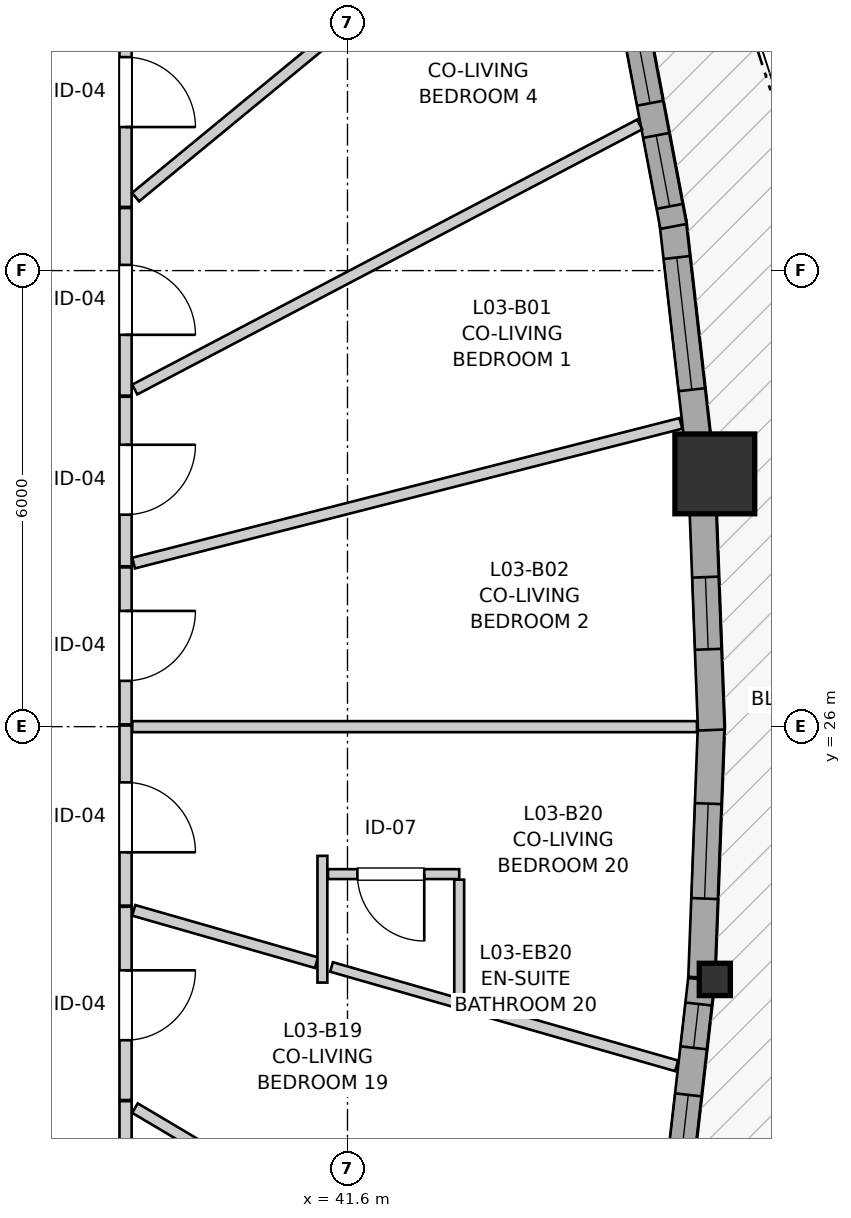
"""IFC4 building model, lengths in metres.
Left out: names, types, materials, properties, quantities, classifications, styles, units other than length and angle.
Written with IfcOpenShell. Run it as: python <this file> out.ifc"""

import sys

from ifc_helpers import new_model, si_unit, direction, frame, frame_2d, origin, origin_2d, place, context, subcontext, project, spatial, rectangle, i_section, extrude, source, transform, mapped, element, fill, save


model = new_model("IFC4")
c1 = context("Model", 3, precision=1e-05, world=origin(), true_north=direction((0.0, 1.0)))
c2 = subcontext(c1, "Body", "Model", "MODEL_VIEW")
j1 = project(units=[si_unit("LENGTHUNIT", "METRE"), si_unit("PLANEANGLEUNIT", "RADIAN")], contexts=[c1])
p1 = place(None, origin())
s1 = spatial("IfcSite", under=j1, at=p1, CompositionType="ELEMENT")
p2 = place(p1, origin())
s2 = spatial("IfcBuilding", under=s1, at=p2, CompositionType="ELEMENT")
p3 = place(p2, frame((0.0, 0.0, 14.2)))
s3 = spatial("IfcBuildingStorey", under=s2, at=p3, CompositionType="ELEMENT", Elevation=14.2)
m1 = source(origin(), c2, "Body", "SweptSolid", [
    extrude(i_section(OverallWidth=0.409, OverallDepth=0.425, WebThickness=0.03, FlangeThickness=0.048, FilletRadius=0.015, at=origin_2d()), origin(), (0.0, 0.0, 1.0), 2.94),
])
p4 = place(p3, frame((46.433, 22.675, 0.0), z_axis=(0.0, 0.0, 1.0), x_axis=(1.0, 0.0, 0.0)))
e1 = element("IfcColumn", 1, at=p4, inside=s3, PredefinedType="PILASTER", context=c2, shape_type="MappedRepresentation", body=[
    mapped(m1, transform((0.0, 0.0, 0.0), x_axis=(1.0, 0.0, 0.0), y_axis=(0.0, 1.0, 0.0), z_axis=(0.0, 0.0, 1.0), scale=1.0)),
])
m2 = source(origin(), c2, "Body", "SweptSolid", [
    extrude(rectangle(XDim=1.05, YDim=1.05, at=origin_2d()), origin(), (0.0, 0.0, 1.0), 2.94),
])
p5 = place(p3, frame((46.433, 29.325, 0.0), z_axis=(0.0, 0.0, 1.0), x_axis=(1.0, 0.0, 0.0)))
e2 = element("IfcColumn", 2, at=p5, inside=s3, PredefinedType="COLUMN", context=c2, shape_type="MappedRepresentation", body=[
    mapped(m2, transform((0.0, 0.0, 0.0), x_axis=(1.0, 0.0, 0.0), y_axis=(0.0, 1.0, 0.0), z_axis=(0.0, 0.0, 1.0), scale=1.0)),
])
p6 = place(p3, frame((45.875, 19.331, 0.0), z_axis=(0.0, 0.0, 1.0), x_axis=(0.113329685842, 0.99355743785, 0.0)))
e3 = element("IfcWall", 3, at=p6, inside=s3, PredefinedType="SOLIDWALL", context=c2, shape_type="SweptSolid", body=[
    extrude(rectangle(XDim=3.365, YDim=0.35, at=frame_2d((1.683, 0.0))), origin(), (0.0, 0.0, 1.0), 2.42),
])
p7 = place(p6, frame((0.437, 0.0, 0.82)))
e4 = element("IfcOpeningElement", 4, at=p7, cuts=e3, PredefinedType="OPENING", context=c2, shape_type="SweptSolid", body=[
    extrude(rectangle(XDim=1.4, YDim=1.35, at=frame_2d((0.7, 0.675))), frame((0.0, 0.185, 0.0), z_axis=(0.0, -1.0, 0.0), x_axis=(1.0, 0.0, 0.0)), (0.0, 0.0, 1.0), 0.37),
])
p8 = place(p6, frame((2.459, 0.0, 0.82)))
e5 = element("IfcOpeningElement", 5, at=p8, cuts=e3, PredefinedType="OPENING", context=c2, shape_type="SweptSolid", body=[
    extrude(rectangle(XDim=0.58, YDim=1.35, at=frame_2d((0.29, 0.675))), frame((0.0, 0.185, 0.0), z_axis=(0.0, -1.0, 0.0), x_axis=(1.0, 0.0, 0.0)), (0.0, 0.0, 1.0), 0.37),
])
p9 = place(p3, frame((46.259, 22.701, 0.0), z_axis=(0.0, 0.0, 1.0), x_axis=(0.038015581842, 0.99927714651, 0.0)))
e6 = element("IfcWall", 6, at=p9, inside=s3, PredefinedType="SOLIDWALL", context=c2, shape_type="SweptSolid", body=[
    extrude(rectangle(XDim=3.346, YDim=0.35, at=frame_2d((1.673, 0.0))), origin(), (0.0, 0.0, 1.0), 2.42),
])
p10 = place(p9, frame((1.038, 0.0, 0.82)))
e7 = element("IfcOpeningElement", 7, at=p10, cuts=e6, PredefinedType="OPENING", context=c2, shape_type="SweptSolid", body=[
    extrude(rectangle(XDim=1.25, YDim=1.35, at=frame_2d((0.625, 0.675))), frame((0.0, 0.185, 0.0), z_axis=(0.0, -1.0, 0.0), x_axis=(1.0, 0.0, 0.0)), (0.0, 0.0, 1.0), 0.37),
])
p11 = place(p3, frame((46.386, 25.955, 0.0), z_axis=(0.0, 0.0, 1.0), x_axis=(-0.038063081658, 0.99927533834, 0.0)))
e8 = element("IfcWall", 8, at=p11, inside=s3, PredefinedType="SOLIDWALL", context=c2, shape_type="SweptSolid", body=[
    extrude(rectangle(XDim=3.066, YDim=0.35, at=frame_2d((1.533, 0.0))), origin(), (0.0, 0.0, 1.0), 2.42),
])
p12 = place(p11, frame((1.063, 0.0, 0.82)))
e9 = element("IfcOpeningElement", 9, at=p12, cuts=e8, PredefinedType="OPENING", context=c2, shape_type="SweptSolid", body=[
    extrude(rectangle(XDim=0.95, YDim=1.35, at=frame_2d((0.475, 0.675))), frame((0.0, 0.185, 0.0), z_axis=(0.0, -1.0, 0.0), x_axis=(1.0, 0.0, 0.0)), (0.0, 0.0, 1.0), 0.37),
])
p13 = place(p3, frame((46.225, 29.604, 0.0), z_axis=(0.0, 0.0, 1.0), x_axis=(-0.113323399269, 0.993558154905, 0.0)))
e10 = element("IfcWall", 10, at=p13, inside=s3, PredefinedType="SOLIDWALL", context=c2, shape_type="SweptSolid", body=[
    extrude(rectangle(XDim=3.085, YDim=0.35, at=frame_2d((1.542, 0.0))), origin(), (0.0, 0.0, 1.0), 2.42),
])
p14 = place(p13, frame((0.835, 0.0, 0.82)))
e11 = element("IfcOpeningElement", 11, at=p14, cuts=e10, PredefinedType="OPENING", context=c2, shape_type="SweptSolid", body=[
    extrude(rectangle(XDim=1.75, YDim=1.3, at=frame_2d((0.875, 0.65))), frame((0.0, 0.185, 0.0), z_axis=(0.0, -1.0, 0.0), x_axis=(1.0, 0.0, 0.0)), (0.0, 0.0, 1.0), 0.37),
])
p15 = place(p3, frame((45.889, 32.581, 0.0), z_axis=(0.0, 0.0, 1.0), x_axis=(-0.186670339622, 0.98242260983, 0.0)))
e12 = element("IfcWall", 12, at=p15, inside=s3, PredefinedType="SOLIDWALL", context=c2, shape_type="SweptSolid", body=[
    extrude(rectangle(XDim=3.403, YDim=0.35, at=frame_2d((1.702, 0.0))), origin(), (0.0, 0.0, 1.0), 2.42),
])
p16 = place(p15, frame((0.269, 0.0, 0.82)))
e13 = element("IfcOpeningElement", 13, at=p16, cuts=e12, PredefinedType="OPENING", context=c2, shape_type="SweptSolid", body=[
    extrude(rectangle(XDim=0.95, YDim=1.35, at=frame_2d((0.475, 0.675))), frame((0.0, 0.185, 0.0), z_axis=(0.0, -1.0, 0.0), x_axis=(1.0, 0.0, 0.0)), (0.0, 0.0, 1.0), 0.37),
])
p17 = place(p15, frame((1.65, 0.0, 0.82)))
e14 = element("IfcOpeningElement", 14, at=p17, cuts=e12, PredefinedType="OPENING", context=c2, shape_type="SweptSolid", body=[
    extrude(rectangle(XDim=1.45, YDim=1.25, at=frame_2d((0.725, 0.625))), frame((0.0, 0.185, 0.0), z_axis=(0.0, -1.0, 0.0), x_axis=(1.0, 0.0, 0.0)), (0.0, 0.0, 1.0), 0.37),
])
p18 = place(p3, frame((38.68, 21.073, 0.0), z_axis=(0.0, 0.0, 1.0), x_axis=(0.0, -1.0, 0.0)))
e15 = element("IfcWall", 15, at=p18, inside=s3, PredefinedType="PARTITIONING", context=c2, shape_type="SweptSolid", body=[
    extrude(rectangle(XDim=3.589, YDim=0.16, at=frame_2d((1.794, 0.0))), origin(), (0.0, 0.0, 1.0), 2.94),
])
p19 = place(p18, frame((1.333, 0.0, 0.0)))
e16 = element("IfcOpeningElement", 16, at=p19, cuts=e15, PredefinedType="OPENING", context=c2, shape_type="SweptSolid", body=[
    extrude(rectangle(XDim=0.92, YDim=2.1, at=frame_2d((0.46, 1.05))), frame((0.0, 0.09, 0.0), z_axis=(0.0, -1.0, 0.0), x_axis=(1.0, 0.0, 0.0)), (0.0, 0.0, 1.0), 0.18),
])
p20 = place(p3, frame((38.68, 35.862, 0.0), z_axis=(0.0, 0.0, 1.0), x_axis=(0.0, -1.0, 0.0)))
e17 = element("IfcWall", 17, at=p20, inside=s3, PredefinedType="PARTITIONING", context=c2, shape_type="SweptSolid", body=[
    extrude(rectangle(XDim=3.024, YDim=0.16, at=frame_2d((1.512, 0.0))), origin(), (0.0, 0.0, 1.0), 2.94),
])
p21 = place(p20, frame((1.053, 0.0, 0.0)))
e18 = element("IfcOpeningElement", 18, at=p21, cuts=e17, PredefinedType="OPENING", context=c2, shape_type="SweptSolid", body=[
    extrude(rectangle(XDim=0.92, YDim=2.1, at=frame_2d((0.46, 1.05))), frame((0.0, 0.09, 0.0), z_axis=(0.0, -1.0, 0.0), x_axis=(1.0, 0.0, 0.0)), (0.0, 0.0, 1.0), 0.18),
])
p22 = place(p3, frame((38.68, 23.63, 0.0), z_axis=(0.0, 0.0, 1.0), x_axis=(0.0, -1.0, 0.0)))
e19 = element("IfcWall", 19, at=p22, inside=s3, PredefinedType="PARTITIONING", context=c2, shape_type="SweptSolid", body=[
    extrude(rectangle(XDim=2.542, YDim=0.16, at=frame_2d((1.271, 0.0))), origin(), (0.0, 0.0, 1.0), 2.94),
])
p23 = place(p22, frame((0.835, 0.0, 0.0)))
e20 = element("IfcOpeningElement", 20, at=p23, cuts=e19, PredefinedType="OPENING", context=c2, shape_type="SweptSolid", body=[
    extrude(rectangle(XDim=0.92, YDim=2.1, at=frame_2d((0.46, 1.05))), frame((0.0, 0.09, 0.0), z_axis=(0.0, -1.0, 0.0), x_axis=(1.0, 0.0, 0.0)), (0.0, 0.0, 1.0), 0.18),
])
p24 = place(p3, frame((38.68, 32.823, 0.0), z_axis=(0.0, 0.0, 1.0), x_axis=(0.0, -1.0, 0.0)))
e21 = element("IfcWall", 21, at=p24, inside=s3, PredefinedType="PARTITIONING", context=c2, shape_type="SweptSolid", body=[
    extrude(rectangle(XDim=2.468, YDim=0.16, at=frame_2d((1.234, 0.0))), origin(), (0.0, 0.0, 1.0), 2.94),
])
p25 = place(p24, frame((0.748, 0.0, 0.0)))
e22 = element("IfcOpeningElement", 22, at=p25, cuts=e21, PredefinedType="OPENING", context=c2, shape_type="SweptSolid", body=[
    extrude(rectangle(XDim=0.92, YDim=2.1, at=frame_2d((0.46, 1.05))), frame((0.0, 0.09, 0.0), z_axis=(0.0, -1.0, 0.0), x_axis=(1.0, 0.0, 0.0)), (0.0, 0.0, 1.0), 0.18),
])
p26 = place(p3, frame((38.68, 26.015, 0.0), z_axis=(0.0, 0.0, 1.0), x_axis=(0.0, -1.0, 0.0)))
e23 = element("IfcWall", 23, at=p26, inside=s3, PredefinedType="PARTITIONING", context=c2, shape_type="SweptSolid", body=[
    extrude(rectangle(XDim=2.37, YDim=0.16, at=frame_2d((1.185, 0.0))), origin(), (0.0, 0.0, 1.0), 2.94),
])
p27 = place(p26, frame((0.748, 0.0, 0.0)))
e24 = element("IfcOpeningElement", 24, at=p27, cuts=e23, PredefinedType="OPENING", context=c2, shape_type="SweptSolid", body=[
    extrude(rectangle(XDim=0.92, YDim=2.1, at=frame_2d((0.46, 1.05))), frame((0.0, 0.09, 0.0), z_axis=(0.0, -1.0, 0.0), x_axis=(1.0, 0.0, 0.0)), (0.0, 0.0, 1.0), 0.18),
])
p28 = place(p3, frame((38.68, 30.34, 0.0), z_axis=(0.0, 0.0, 1.0), x_axis=(0.0, -1.0, 0.0)))
e25 = element("IfcWall", 25, at=p28, inside=s3, PredefinedType="PARTITIONING", context=c2, shape_type="SweptSolid", body=[
    extrude(rectangle(XDim=2.23, YDim=0.16, at=frame_2d((1.115, 0.0))), origin(), (0.0, 0.0, 1.0), 2.94),
])
p29 = place(p28, frame((0.632, 0.0, 0.0)))
e26 = element("IfcOpeningElement", 26, at=p29, cuts=e25, PredefinedType="OPENING", context=c2, shape_type="SweptSolid", body=[
    extrude(rectangle(XDim=0.92, YDim=2.1, at=frame_2d((0.46, 1.05))), frame((0.0, 0.09, 0.0), z_axis=(0.0, -1.0, 0.0), x_axis=(1.0, 0.0, 0.0)), (0.0, 0.0, 1.0), 0.18),
])
p30 = place(p3, frame((38.68, 28.095, 0.0), z_axis=(0.0, 0.0, 1.0), x_axis=(0.0, -1.0, 0.0)))
e27 = element("IfcWall", 27, at=p30, inside=s3, PredefinedType="PARTITIONING", context=c2, shape_type="SweptSolid", body=[
    extrude(rectangle(XDim=2.065, YDim=0.16, at=frame_2d((1.032, 0.0))), origin(), (0.0, 0.0, 1.0), 2.94),
])
p31 = place(p30, frame((0.573, 0.0, 0.0)))
e28 = element("IfcOpeningElement", 28, at=p31, cuts=e27, PredefinedType="OPENING", context=c2, shape_type="SweptSolid", body=[
    extrude(rectangle(XDim=0.92, YDim=2.1, at=frame_2d((0.46, 1.05))), frame((0.0, 0.09, 0.0), z_axis=(0.0, -1.0, 0.0), x_axis=(1.0, 0.0, 0.0)), (0.0, 0.0, 1.0), 0.18),
])
p32 = place(p3, frame((43.07, 24.06, 0.0), z_axis=(0.0, 0.0, 1.0), x_axis=(-1.0, 0.0, 0.0)))
e29 = element("IfcWall", 29, at=p32, inside=s3, PredefinedType="PARTITIONING", context=c2, shape_type="SweptSolid", body=[
    extrude(rectangle(XDim=1.727, YDim=0.13, at=frame_2d((0.864, 0.0))), origin(), (0.0, 0.0, 1.0), 2.94),
])
p33 = place(p32, frame((0.46, 0.0, 0.0)))
e30 = element("IfcOpeningElement", 30, at=p33, cuts=e29, PredefinedType="OPENING", context=c2, shape_type="SweptSolid", body=[
    extrude(rectangle(XDim=0.88, YDim=2.05, at=frame_2d((0.44, 1.025))), frame((0.0, 0.075, 0.0), z_axis=(0.0, -1.0, 0.0), x_axis=(1.0, 0.0, 0.0)), (0.0, 0.0, 1.0), 0.15),
])
p34 = place(p3, frame((38.812, 32.967, 0.0), z_axis=(0.0, 0.0, 1.0), x_axis=(0.772048037558, 0.635564180633, 0.0)))
e31 = element("IfcWall", 31, at=p34, inside=s3, PredefinedType="PARTITIONING", context=c2, shape_type="SweptSolid", body=[
    extrude(rectangle(XDim=7.477, YDim=0.145, at=frame_2d((3.739, 0.0))), origin(), (0.0, 0.0, 1.0), 2.94),
])
p35 = place(p3, frame((38.801, 30.435, 0.0), z_axis=(0.0, 0.0, 1.0), x_axis=(0.885428701358, 0.46477523042, 0.0)))
e32 = element("IfcWall", 32, at=p35, inside=s3, PredefinedType="PARTITIONING", context=c2, shape_type="SweptSolid", body=[
    extrude(rectangle(XDim=7.503, YDim=0.145, at=frame_2d((3.751, 0.0))), origin(), (0.0, 0.0, 1.0), 2.94),
])
p36 = place(p3, frame((38.786, 28.152, 0.0), z_axis=(0.0, 0.0, 1.0), x_axis=(0.968940490632, 0.247294006424, 0.0)))
e33 = element("IfcWall", 33, at=p36, inside=s3, PredefinedType="PARTITIONING", context=c2, shape_type="SweptSolid", body=[
    extrude(rectangle(XDim=7.432, YDim=0.145, at=frame_2d((3.716, 0.0))), origin(), (0.0, 0.0, 1.0), 2.94),
])
p37 = place(p3, frame((38.768, 26.0, 0.0), z_axis=(0.0, 0.0, 1.0), x_axis=(1.0, 0.0, 0.0)))
e34 = element("IfcWall", 34, at=p37, inside=s3, PredefinedType="PARTITIONING", context=c2, shape_type="SweptSolid", body=[
    extrude(rectangle(XDim=7.43, YDim=0.145, at=frame_2d((3.715, 0.0))), origin(), (0.0, 0.0, 1.0), 2.94),
])
p38 = place(p3, frame((38.804, 20.981, 0.0), z_axis=(0.0, 0.0, 1.0), x_axis=(0.859905944731, -0.510452511225, 0.0)))
e35 = element("IfcWall", 35, at=p38, inside=s3, PredefinedType="PARTITIONING", context=c2, shape_type="SweptSolid", body=[
    extrude(rectangle(XDim=2.943, YDim=0.145, at=frame_2d((1.472, 0.0))), origin(), (0.0, 0.0, 1.0), 2.94),
])
p39 = place(p3, frame((43.055, 22.361, 0.0), z_axis=(0.0, 0.0, 1.0), x_axis=(0.961351316588, -0.275324619486, 0.0)))
e36 = element("IfcWall", 36, at=p39, inside=s3, PredefinedType="PARTITIONING", context=c2, shape_type="SweptSolid", body=[
    extrude(rectangle(XDim=2.992, YDim=0.145, at=frame_2d((1.496, 0.0))), origin(), (0.0, 0.0, 1.0), 2.94),
])
p40 = place(p3, frame((38.788, 23.583, 0.0), z_axis=(0.0, 0.0, 1.0), x_axis=(0.961350656565, -0.275326924078, 0.0)))
e37 = element("IfcWall", 37, at=p40, inside=s3, PredefinedType="PARTITIONING", context=c2, shape_type="SweptSolid", body=[
    extrude(rectangle(XDim=2.501, YDim=0.145, at=frame_2d((1.251, 0.0))), origin(), (0.0, 0.0, 1.0), 2.94),
])
p41 = place(p3, frame((41.39, 22.838, 0.0), z_axis=(0.0, 0.0, 1.0), x_axis=(0.961362810051, -0.275284484582, 0.0)))
e38 = element("IfcWall", 38, at=p41, inside=s3, PredefinedType="PARTITIONING", context=c2, shape_type="SweptSolid", body=[
    extrude(rectangle(XDim=1.717, YDim=0.13, at=frame_2d((0.858, 0.0))), origin(), (0.0, 0.0, 1.0), 2.94),
])
p42 = place(p3, frame((43.07, 22.459, 0.0), z_axis=(0.0, 0.0, 1.0), x_axis=(0.0, 1.0, 0.0)))
e39 = element("IfcWall", 39, at=p42, inside=s3, PredefinedType="PARTITIONING", context=c2, shape_type="SweptSolid", body=[
    extrude(rectangle(XDim=1.528, YDim=0.13, at=frame_2d((0.764, 0.0))), origin(), (0.0, 0.0, 1.0), 2.508),
])
p43 = place(p3, frame((41.27, 22.633, 0.0), z_axis=(0.0, 0.0, 1.0), x_axis=(0.0, 1.0, 0.0)))
e40 = element("IfcWall", 40, at=p43, inside=s3, PredefinedType="PARTITIONING", context=c2, shape_type="SweptSolid", body=[
    extrude(rectangle(XDim=1.667, YDim=0.13, at=frame_2d((0.833, 0.0))), origin(), (0.0, 0.0, 1.0), 2.94),
])
m3 = source(origin(), c2, "Body", "SweptSolid", [
    extrude(rectangle(XDim=1.4, YDim=1.35, at=frame_2d((0.7, 0.675))), frame((0.0, 0.03, 0.0), z_axis=(0.0, -1.0, 0.0), x_axis=(1.0, 0.0, 0.0)), (0.0, 0.0, 1.0), 0.06),
])
p44 = place(p7, origin())
e41 = element("IfcWindow", 41, at=p44, inside=s3, PartitioningType="SINGLE_PANEL", PredefinedType="WINDOW", context=c2, shape_type="MappedRepresentation", body=[
    mapped(m3, transform((0.0, 0.0, 0.0), x_axis=(1.0, 0.0, 0.0), y_axis=(0.0, 1.0, 0.0), z_axis=(0.0, 0.0, 1.0), scale=1.0)),
])
fill(e4, e41)
m4 = source(origin(), c2, "Body", "SweptSolid", [
    extrude(rectangle(XDim=0.58, YDim=1.35, at=frame_2d((0.29, 0.675))), frame((0.0, 0.03, 0.0), z_axis=(0.0, -1.0, 0.0), x_axis=(1.0, 0.0, 0.0)), (0.0, 0.0, 1.0), 0.06),
])
p45 = place(p8, origin())
e42 = element("IfcWindow", 42, at=p45, inside=s3, PartitioningType="SINGLE_PANEL", PredefinedType="WINDOW", context=c2, shape_type="MappedRepresentation", body=[
    mapped(m4, transform((0.0, 0.0, 0.0), x_axis=(1.0, 0.0, 0.0), y_axis=(0.0, 1.0, 0.0), z_axis=(0.0, 0.0, 1.0), scale=1.0)),
])
fill(e5, e42)
m5 = source(origin(), c2, "Body", "SweptSolid", [
    extrude(rectangle(XDim=1.25, YDim=1.35, at=frame_2d((0.625, 0.675))), frame((0.0, 0.03, 0.0), z_axis=(0.0, -1.0, 0.0), x_axis=(1.0, 0.0, 0.0)), (0.0, 0.0, 1.0), 0.06),
])
p46 = place(p10, origin())
e43 = element("IfcWindow", 43, at=p46, inside=s3, PartitioningType="SINGLE_PANEL", PredefinedType="WINDOW", context=c2, shape_type="MappedRepresentation", body=[
    mapped(m5, transform((0.0, 0.0, 0.0), x_axis=(1.0, 0.0, 0.0), y_axis=(0.0, 1.0, 0.0), z_axis=(0.0, 0.0, 1.0), scale=1.0)),
])
fill(e7, e43)
m6 = source(origin(), c2, "Body", "SweptSolid", [
    extrude(rectangle(XDim=0.95, YDim=1.35, at=frame_2d((0.475, 0.675))), frame((0.0, 0.03, 0.0), z_axis=(0.0, -1.0, 0.0), x_axis=(1.0, 0.0, 0.0)), (0.0, 0.0, 1.0), 0.06),
])
p47 = place(p12, origin())
e44 = element("IfcWindow", 44, at=p47, inside=s3, PartitioningType="SINGLE_PANEL", PredefinedType="WINDOW", context=c2, shape_type="MappedRepresentation", body=[
    mapped(m6, transform((0.0, 0.0, 0.0), x_axis=(1.0, 0.0, 0.0), y_axis=(0.0, 1.0, 0.0), z_axis=(0.0, 0.0, 1.0), scale=1.0)),
])
fill(e9, e44)
m7 = source(origin(), c2, "Body", "SweptSolid", [
    extrude(rectangle(XDim=1.75, YDim=1.3, at=frame_2d((0.875, 0.65))), frame((0.0, 0.03, 0.0), z_axis=(0.0, -1.0, 0.0), x_axis=(1.0, 0.0, 0.0)), (0.0, 0.0, 1.0), 0.06),
])
p48 = place(p14, origin())
e45 = element("IfcWindow", 45, at=p48, inside=s3, PartitioningType="SINGLE_PANEL", PredefinedType="WINDOW", context=c2, shape_type="MappedRepresentation", body=[
    mapped(m7, transform((0.0, 0.0, 0.0), x_axis=(1.0, 0.0, 0.0), y_axis=(0.0, 1.0, 0.0), z_axis=(0.0, 0.0, 1.0), scale=1.0)),
])
fill(e11, e45)
p49 = place(p16, origin())
e46 = element("IfcWindow", 46, at=p49, inside=s3, PartitioningType="SINGLE_PANEL", PredefinedType="WINDOW", context=c2, shape_type="MappedRepresentation", body=[
    mapped(m6, transform((0.0, 0.0, 0.0), x_axis=(1.0, 0.0, 0.0), y_axis=(0.0, 1.0, 0.0), z_axis=(0.0, 0.0, 1.0), scale=1.0)),
])
fill(e13, e46)
m8 = source(origin(), c2, "Body", "SweptSolid", [
    extrude(rectangle(XDim=1.45, YDim=1.25, at=frame_2d((0.725, 0.625))), frame((0.0, 0.03, 0.0), z_axis=(0.0, -1.0, 0.0), x_axis=(1.0, 0.0, 0.0)), (0.0, 0.0, 1.0), 0.06),
])
p50 = place(p17, origin())
e47 = element("IfcWindow", 47, at=p50, inside=s3, PartitioningType="SINGLE_PANEL", PredefinedType="WINDOW", context=c2, shape_type="MappedRepresentation", body=[
    mapped(m8, transform((0.0, 0.0, 0.0), x_axis=(1.0, 0.0, 0.0), y_axis=(0.0, 1.0, 0.0), z_axis=(0.0, 0.0, 1.0), scale=1.0)),
])
fill(e14, e47)
m9 = source(origin(), c2, "Body", "SweptSolid", [
    extrude(rectangle(XDim=0.92, YDim=2.1, at=frame_2d((0.46, 1.05))), frame((0.0, 0.025, 0.0), z_axis=(0.0, -1.0, 0.0), x_axis=(1.0, 0.0, 0.0)), (0.0, 0.0, 1.0), 0.05),
])
p51 = place(p21, origin())
e48 = element("IfcDoor", 48, at=p51, inside=s3, OperationType="SINGLE_SWING_RIGHT", PredefinedType="DOOR", context=c2, shape_type="MappedRepresentation", body=[
    mapped(m9, transform((0.0, 0.0, 0.0), x_axis=(1.0, 0.0, 0.0), y_axis=(0.0, 1.0, 0.0), z_axis=(0.0, 0.0, 1.0), scale=1.0)),
])
fill(e18, e48)
p52 = place(p23, origin())
e49 = element("IfcDoor", 49, at=p52, inside=s3, OperationType="SINGLE_SWING_LEFT", PredefinedType="DOOR", context=c2, shape_type="MappedRepresentation", body=[
    mapped(m9, transform((0.0, 0.0, 0.0), x_axis=(1.0, 0.0, 0.0), y_axis=(0.0, 1.0, 0.0), z_axis=(0.0, 0.0, 1.0), scale=1.0)),
])
fill(e20, e49)
p53 = place(p25, origin())
e50 = element("IfcDoor", 50, at=p53, inside=s3, OperationType="SINGLE_SWING_RIGHT", PredefinedType="DOOR", context=c2, shape_type="MappedRepresentation", body=[
    mapped(m9, transform((0.0, 0.0, 0.0), x_axis=(1.0, 0.0, 0.0), y_axis=(0.0, 1.0, 0.0), z_axis=(0.0, 0.0, 1.0), scale=1.0)),
])
fill(e22, e50)
p54 = place(p27, origin())
e51 = element("IfcDoor", 51, at=p54, inside=s3, OperationType="SINGLE_SWING_RIGHT", PredefinedType="DOOR", context=c2, shape_type="MappedRepresentation", body=[
    mapped(m9, transform((0.0, 0.0, 0.0), x_axis=(1.0, 0.0, 0.0), y_axis=(0.0, 1.0, 0.0), z_axis=(0.0, 0.0, 1.0), scale=1.0)),
])
fill(e24, e51)
p55 = place(p29, origin())
e52 = element("IfcDoor", 52, at=p55, inside=s3, OperationType="SINGLE_SWING_LEFT", PredefinedType="DOOR", context=c2, shape_type="MappedRepresentation", body=[
    mapped(m9, transform((0.0, 0.0, 0.0), x_axis=(1.0, 0.0, 0.0), y_axis=(0.0, 1.0, 0.0), z_axis=(0.0, 0.0, 1.0), scale=1.0)),
])
fill(e26, e52)
p56 = place(p31, origin())
e53 = element("IfcDoor", 53, at=p56, inside=s3, OperationType="SINGLE_SWING_LEFT", PredefinedType="DOOR", context=c2, shape_type="MappedRepresentation", body=[
    mapped(m9, transform((0.0, 0.0, 0.0), x_axis=(1.0, 0.0, 0.0), y_axis=(0.0, 1.0, 0.0), z_axis=(0.0, 0.0, 1.0), scale=1.0)),
])
fill(e28, e53)
m10 = source(origin(), c2, "Body", "SweptSolid", [
    extrude(rectangle(XDim=0.88, YDim=2.05, at=frame_2d((0.44, 1.025))), frame((0.0, 0.025, 0.0), z_axis=(0.0, -1.0, 0.0), x_axis=(1.0, 0.0, 0.0)), (0.0, 0.0, 1.0), 0.05),
])
p57 = place(p33, origin())
e54 = element("IfcDoor", 54, at=p57, inside=s3, OperationType="SINGLE_SWING_LEFT", PredefinedType="DOOR", context=c2, shape_type="MappedRepresentation", body=[
    mapped(m10, transform((0.0, 0.0, 0.0), x_axis=(1.0, 0.0, 0.0), y_axis=(0.0, 1.0, 0.0), z_axis=(0.0, 0.0, 1.0), scale=1.0)),
])
fill(e30, e54)
save(model, sys.argv[1])
